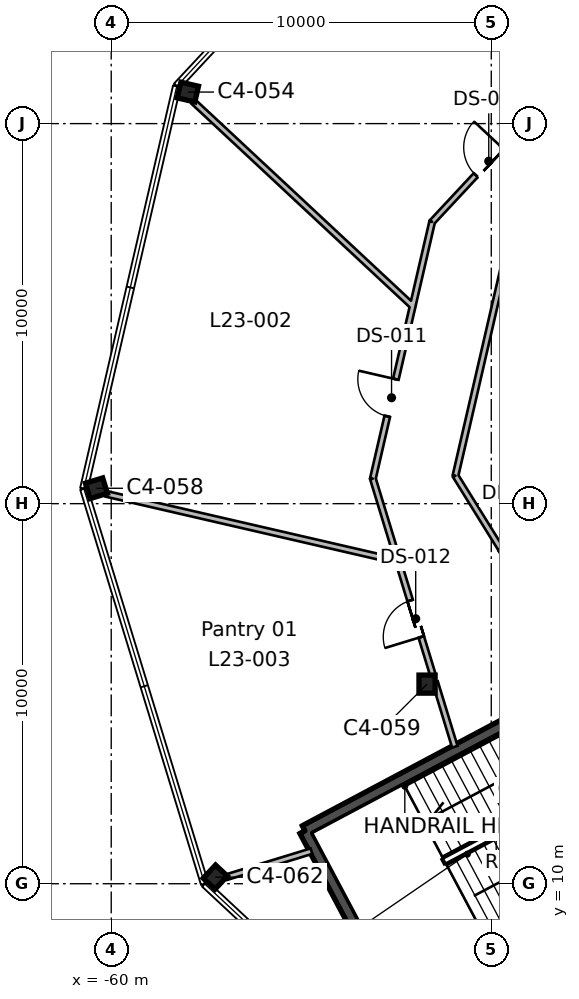
"""IFC4 building model, lengths in metres.
Left out: names, types, materials, properties, quantities, classifications, styles, units other than length and angle.
Written with IfcOpenShell. Run it as: python <this file> out.ifc"""

import sys

from ifc_helpers import new_model, si_unit, direction, frame, frame_2d, origin, origin_2d, place, context, subcontext, project, spatial, rectangle, i_section, extrude, element, fill, save


model = new_model("IFC4")
c1 = context("Model", 3, precision=1e-05, world=origin(), true_north=direction((0.0, 1.0)))
c2 = subcontext(c1, "Body", "Model", "MODEL_VIEW")
j1 = project(units=[si_unit("LENGTHUNIT", "METRE"), si_unit("PLANEANGLEUNIT", "RADIAN")], contexts=[c1])
p1 = place(None, origin())
s1 = spatial("IfcSite", under=j1, at=p1, CompositionType="ELEMENT")
p2 = place(p1, origin())
s2 = spatial("IfcBuilding", under=s1, at=p2, CompositionType="ELEMENT")
p3 = place(p2, frame((0.0, 0.0, 118.2)))
s3 = spatial("IfcBuildingStorey", under=s2, at=p3, CompositionType="ELEMENT", Elevation=118.2)
for number, where, z_axis, x_axis in (
    (1, (-57.262, 10.173, 0.0), (0.0, 0.0, 1.0), (0.731, -0.682, 0.0)),
    (2, (-51.69, 15.252, 0.0), (0.0, 0.0, 1.0), (1.0, 0.0, 0.0)),
    (3, (-60.39, 20.405, 0.0), (0.0, 0.0, 1.0), (0.292, -0.956, 0.0)),
    (4, (-57.983, 30.83, 0.0), (0.0, 0.0, 1.0), (-0.225, -0.974, 0.0)),
):
    element("IfcColumn", number, at=place(p3, frame(where, z_axis=z_axis, x_axis=x_axis)), inside=s3, PredefinedType="COLUMN", context=c2, shape_type="SweptSolid", body=[
        extrude(i_section(OverallWidth=0.424, OverallDepth=0.475, WebThickness=0.048, FlangeThickness=0.077, FilletRadius=0.015, at=origin_2d()), origin(), (0.0, 0.0, 1.0), 4.0),
    ])
p4 = place(p3, frame((-45.297, 11.007, 0.0), z_axis=(0.0, 0.0, 1.0), x_axis=(-0.882951519127, -0.469464178475, 0.0)))
e5 = element("IfcWall", 5, at=p4, inside=s3, PredefinedType="SHEAR", context=c2, shape_type="SweptSolid", body=[
    extrude(rectangle(XDim=8.3, YDim=0.3, at=frame_2d((4.15, 0.0))), origin(), (0.0, 0.0, 1.0), 4.0),
])
p5 = place(p3, frame((-52.626, 7.111, 0.0), z_axis=(0.0, 0.0, 1.0), x_axis=(-0.469464364128, 0.882951420416, 0.0)))
e6 = element("IfcWall", 6, at=p5, inside=s3, PredefinedType="SHEAR", context=c2, shape_type="SweptSolid", body=[
    extrude(rectangle(XDim=4.85, YDim=0.3, at=frame_2d((2.425, 0.0))), origin(), (0.0, 0.0, 1.0), 4.0),
])
p6 = place(p3, frame((-54.903, 11.393, 0.0), z_axis=(0.0, 0.0, 1.0), x_axis=(0.882939326045, 0.469487110071, 0.0)))
e7 = element("IfcWall", 7, at=p6, inside=s3, PredefinedType="SHEAR", context=c2, shape_type="SweptSolid", body=[
    extrude(rectangle(XDim=8.3, YDim=0.3, at=frame_2d((4.15, 0.0))), origin(), (0.0, 0.0, 1.0), 4.0),
])
p7 = place(p6, frame((6.05, 0.0, 0.0)))
e8 = element("IfcOpeningElement", 8, at=p7, cuts=e7, PredefinedType="OPENING", context=c2, shape_type="SweptSolid", body=[
    extrude(rectangle(XDim=1.9, YDim=2.1, at=frame_2d((0.95, 1.05))), frame((0.0, 0.16, 0.0), z_axis=(0.0, -1.0, 0.0), x_axis=(1.0, 0.0, 0.0)), (0.0, 0.0, 1.0), 0.32),
])
p8 = place(p3, frame((-52.45, 18.484, 0.0), z_axis=(0.0, 0.0, 1.0), x_axis=(-0.974348948829, 0.225042498023, 0.0)))
e9 = element("IfcWall", 9, at=p8, inside=s3, PredefinedType="PARTITIONING", context=c2, shape_type="SweptSolid", body=[
    extrude(rectangle(XDim=7.892, YDim=0.15, at=frame_2d((3.946, 0.0))), origin(), (0.0, 0.0, 1.0), 3.64),
])
p9 = place(p3, frame((-57.841, 30.58, 0.0), z_axis=(0.0, 0.0, 1.0), x_axis=(0.731373012185, -0.681977651428, 0.0)))
e10 = element("IfcWall", 10, at=p9, inside=s3, PredefinedType="PARTITIONING", context=c2, shape_type="SweptSolid", body=[
    extrude(rectangle(XDim=7.893, YDim=0.15, at=frame_2d((3.947, 0.0))), origin(), (0.0, 0.0, 1.0), 3.64),
])
p10 = place(p3, frame((-54.732, 10.857, 0.0), z_axis=(0.0, 0.0, 1.0), x_axis=(-0.956196980242, -0.292723991119, 0.0)))
e11 = element("IfcWall", 11, at=p10, inside=s3, PredefinedType="PARTITIONING", context=c2, shape_type="SweptSolid", body=[
    extrude(rectangle(XDim=2.344, YDim=0.15, at=frame_2d((1.172, 0.0))), origin(), (0.0, 0.0, 1.0), 3.64),
])
p11 = place(p3, frame((-52.056, 25.246, 0.0), z_axis=(0.0, 0.0, 1.0), x_axis=(-0.224961765576, -0.97436759184, 0.0)))
e12 = element("IfcWall", 12, at=p11, inside=s3, PredefinedType="PARTITIONING", context=c2, shape_type="SweptSolid", body=[
    extrude(rectangle(XDim=4.708, YDim=0.15, at=frame_2d((2.354, 0.0))), origin(), (0.0, 0.0, 1.0), 3.64),
])
p12 = place(p11, frame((2.024, 0.0, 0.0)))
e13 = element("IfcOpeningElement", 13, at=p12, cuts=e12, PredefinedType="OPENING", context=c2, shape_type="SweptSolid", body=[
    extrude(rectangle(XDim=1.0, YDim=2.1, at=frame_2d((0.5, 1.05))), frame((0.0, 0.085, 0.0), z_axis=(0.0, -1.0, 0.0), x_axis=(1.0, 0.0, 0.0)), (0.0, 0.0, 1.0), 0.17),
])
p13 = place(p3, frame((-53.115, 20.659, 0.0), z_axis=(0.0, 0.0, 1.0), x_axis=(0.292062202153, -0.956399325634, 0.0)))
e14 = element("IfcWall", 14, at=p13, inside=s3, PredefinedType="PARTITIONING", context=c2, shape_type="SweptSolid", body=[
    extrude(rectangle(XDim=2.222, YDim=0.15, at=frame_2d((1.111, 0.0))), origin(), (0.0, 0.0, 1.0), 3.64),
])
p14 = place(p3, frame((-50.959, 13.604, 0.0), z_axis=(0.0, 0.0, 1.0), x_axis=(-0.292326826569, 0.95631847544, 0.0)))
e15 = element("IfcWall", 15, at=p14, inside=s3, PredefinedType="PARTITIONING", context=c2, shape_type="SweptSolid", body=[
    extrude(rectangle(XDim=1.776, YDim=0.15, at=frame_2d((0.888, 0.0))), origin(), (0.0, 0.0, 1.0), 3.64),
])
p15 = place(p3, frame((-51.535, 15.49, 0.0), z_axis=(0.0, 0.0, 1.0), x_axis=(-0.292522494411, 0.956258641929, 0.0)))
e16 = element("IfcWall", 16, at=p15, inside=s3, PredefinedType="PARTITIONING", context=c2, shape_type="SweptSolid", body=[
    extrude(rectangle(XDim=3.183, YDim=0.15, at=frame_2d((1.592, 0.0))), origin(), (0.0, 0.0, 1.0), 3.64),
])
p16 = place(p15, frame((1.05, 0.0, 0.0)))
e17 = element("IfcOpeningElement", 17, at=p16, cuts=e16, PredefinedType="OPENING", context=c2, shape_type="SweptSolid", body=[
    extrude(rectangle(XDim=1.0, YDim=2.1, at=frame_2d((0.5, 1.05))), frame((0.0, 0.085, 0.0), z_axis=(0.0, -1.0, 0.0), x_axis=(1.0, 0.0, 0.0)), (0.0, 0.0, 1.0), 0.17),
])
p17 = place(p3, frame((-48.345, 30.856, 0.0), z_axis=(0.0, 0.0, 1.0), x_axis=(-0.682044743799, -0.731310445335, 0.0)))
e18 = element("IfcWall", 18, at=p17, inside=s3, PredefinedType="PARTITIONING", context=c2, shape_type="SweptSolid", body=[
    extrude(rectangle(XDim=4.708, YDim=0.15, at=frame_2d((2.354, 0.0))), origin(), (0.0, 0.0, 1.0), 3.64),
])
p18 = place(p17, frame((2.024, 0.0, 0.0)))
e19 = element("IfcOpeningElement", 19, at=p18, cuts=e18, PredefinedType="OPENING", context=c2, shape_type="SweptSolid", body=[
    extrude(rectangle(XDim=1.0, YDim=2.1, at=frame_2d((0.5, 1.05))), frame((0.0, 0.085, 0.0), z_axis=(0.0, -1.0, 0.0), x_axis=(1.0, 0.0, 0.0)), (0.0, 0.0, 1.0), 0.17),
])
p19 = place(p3, frame((-51.556, 27.413, 0.0), z_axis=(0.0, 0.0, 1.0), x_axis=(-0.225019992363, -0.974354146621, 0.0)))
e20 = element("IfcWall", 20, at=p19, inside=s3, PredefinedType="PARTITIONING", context=c2, shape_type="SweptSolid", body=[
    extrude(rectangle(XDim=2.222, YDim=0.15, at=frame_2d((1.111, 0.0))), origin(), (0.0, 0.0, 1.0), 3.64),
])
p20 = place(p3, frame((-50.688, 38.366, 0.0), z_axis=(0.0, 0.0, 1.0), x_axis=(0.292463739097, -0.956276613388, 0.0)))
e21 = element("IfcWall", 21, at=p20, inside=s3, PredefinedType="PARTITIONING", context=c2, shape_type="SweptSolid", body=[
    extrude(rectangle(XDim=7.892, YDim=0.15, at=frame_2d((3.946, 0.0))), origin(), (0.0, 0.0, 1.0), 3.64),
])
p21 = place(p3, frame((-47.618, 15.379, 0.0), z_axis=(0.0, 0.0, 1.0), x_axis=(-0.527298267237, 0.849680255961, 0.0)))
e22 = element("IfcWall", 22, at=p21, inside=s3, PredefinedType="PARTITIONING", context=c2, shape_type="SweptSolid", body=[
    extrude(rectangle(XDim=6.304, YDim=0.15, at=frame_2d((3.152, 0.0))), origin(), (0.0, 0.0, 1.0), 3.64),
])
p22 = place(p21, frame((2.25, 0.0, 0.0)))
e23 = element("IfcOpeningElement", 23, at=p22, cuts=e22, PredefinedType="OPENING", context=c2, shape_type="SweptSolid", body=[
    extrude(rectangle(XDim=1.8, YDim=2.1, at=frame_2d((0.9, 1.05))), frame((0.0, 0.085, 0.0), z_axis=(0.0, -1.0, 0.0), x_axis=(1.0, 0.0, 0.0)), (0.0, 0.0, 1.0), 0.17),
])
p23 = place(p3, frame((-50.942, 20.735, 0.0), z_axis=(0.0, 0.0, 1.0), x_axis=(0.224933214218, 0.974374183331, 0.0)))
e24 = element("IfcWall", 24, at=p23, inside=s3, PredefinedType="PARTITIONING", context=c2, shape_type="SweptSolid", body=[
    extrude(rectangle(XDim=5.806, YDim=0.15, at=frame_2d((2.903, 0.0))), origin(), (0.0, 0.0, 1.0), 3.64),
])
p24 = place(p18, frame((1.0, 0.0, 0.0), z_axis=(0.0, 0.0, 1.0), x_axis=(-1.0, 0.0, 0.0)))
e25 = element("IfcDoor", 25, at=p24, inside=s3, OperationType="SINGLE_SWING_RIGHT", PredefinedType="DOOR", context=c2, shape_type="SweptSolid", body=[
    extrude(rectangle(XDim=1.0, YDim=2.1, at=frame_2d((0.5, 1.05))), frame((0.0, 0.025, 0.0), z_axis=(0.0, -1.0, 0.0), x_axis=(1.0, 0.0, 0.0)), (0.0, 0.0, 1.0), 0.05),
])
fill(e19, e25)
p25 = place(p12, frame((1.0, 0.0, 0.0), z_axis=(0.0, 0.0, 1.0), x_axis=(-1.0, 0.0, 0.0)))
e26 = element("IfcDoor", 26, at=p25, inside=s3, OperationType="SINGLE_SWING_RIGHT", PredefinedType="DOOR", context=c2, shape_type="SweptSolid", body=[
    extrude(rectangle(XDim=1.0, YDim=2.1, at=frame_2d((0.5, 1.05))), frame((0.0, 0.025, 0.0), z_axis=(0.0, -1.0, 0.0), x_axis=(1.0, 0.0, 0.0)), (0.0, 0.0, 1.0), 0.05),
])
fill(e13, e26)
p26 = place(p16, origin())
e27 = element("IfcDoor", 27, at=p26, inside=s3, OperationType="SINGLE_SWING_LEFT", PredefinedType="DOOR", context=c2, shape_type="SweptSolid", body=[
    extrude(rectangle(XDim=1.0, YDim=2.1, at=frame_2d((0.5, 1.05))), frame((0.0, 0.025, 0.0), z_axis=(0.0, -1.0, 0.0), x_axis=(1.0, 0.0, 0.0)), (0.0, 0.0, 1.0), 0.05),
])
fill(e17, e27)
save(model, sys.argv[1])
